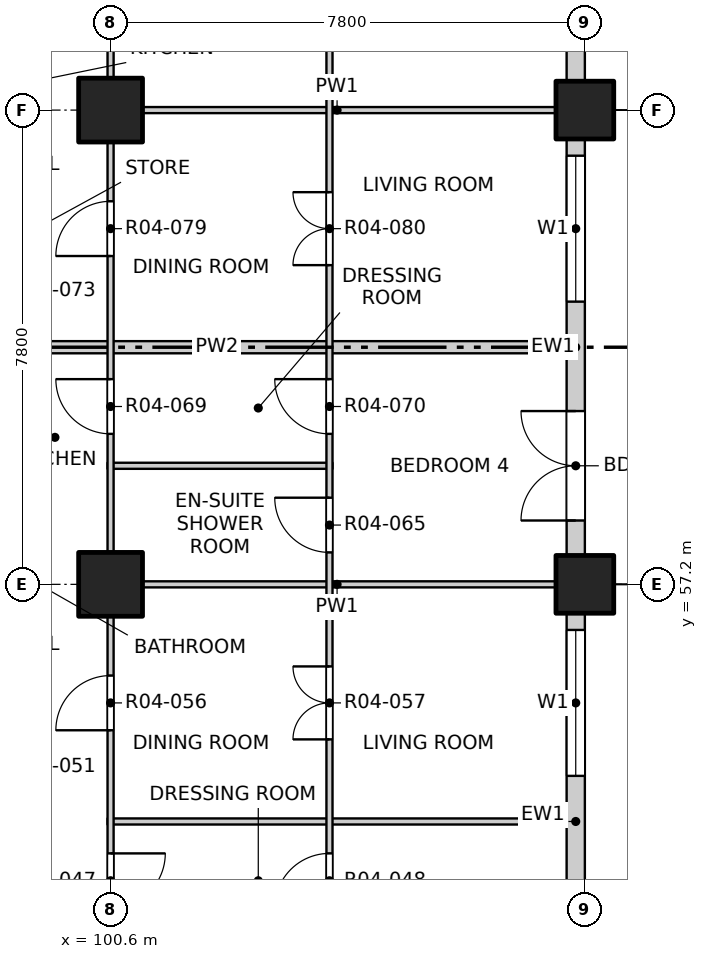
"""IFC4 building model, lengths in metres.
Left out: names, types, materials, properties, quantities, classifications, styles, units other than length and angle.
Written with IfcOpenShell. Run it as: python <this file> out.ifc"""

import sys

from ifc_helpers import new_model, si_unit, direction, frame, frame_2d, origin, origin_2d, place, context, subcontext, project, spatial, rectangle, extrude, element, fill, save


model = new_model("IFC4")
c1 = context("Model", 3, precision=1e-05, world=origin(), true_north=direction((0.0, 1.0)))
c2 = subcontext(c1, "Body", "Model", "MODEL_VIEW")
j1 = project(units=[si_unit("LENGTHUNIT", "METRE"), si_unit("PLANEANGLEUNIT", "RADIAN")], contexts=[c1])
p1 = place(None, origin())
s1 = spatial("IfcSite", under=j1, at=p1, CompositionType="ELEMENT")
p2 = place(p1, origin())
s2 = spatial("IfcBuilding", under=s1, at=p2, CompositionType="ELEMENT")
p3 = place(p2, frame((0.0, 0.0, 58.0)))
s3 = spatial("IfcBuildingStorey", under=s2, at=p3, CompositionType="ELEMENT", Elevation=58.0)
for number, where, z_axis, x_axis in (
    (1, (108.4, 57.2, -0.25), (0.0, 0.0, 1.0), (1.0, 0.0, 0.0)),
    (2, (108.4, 65.0, -0.25), (0.0, 0.0, 1.0), (1.0, 0.0, 0.0)),
):
    element("IfcColumn", number, at=place(p3, frame(where, z_axis=z_axis, x_axis=x_axis)), inside=s3, PredefinedType="COLUMN", context=c2, shape_type="SweptSolid", body=[
        extrude(rectangle(XDim=0.95, YDim=0.95, at=origin_2d()), origin(), (0.0, 0.0, 1.0), 3.4),
    ])
for number, where, z_axis, x_axis in (
    (3, (100.6, 57.2, -0.25), (0.0, 0.0, 1.0), (1.0, 0.0, 0.0)),
    (4, (100.6, 65.0, -0.25), (0.0, 0.0, 1.0), (1.0, 0.0, 0.0)),
):
    element("IfcColumn", number, at=place(p3, frame(where, z_axis=z_axis, x_axis=x_axis)), inside=s3, PredefinedType="COLUMN", context=c2, shape_type="SweptSolid", body=[
        extrude(rectangle(XDim=1.05, YDim=1.05, at=origin_2d()), origin(), (0.0, 0.0, 1.0), 3.4),
    ])
p4 = place(p3, frame((108.25, 49.875, 0.0), z_axis=(0.0, 0.0, 1.0), x_axis=(0.0, 1.0, 0.0)))
e5 = element("IfcWall", 5, at=p4, inside=s3, PredefinedType="SOLIDWALL", context=c2, shape_type="SweptSolid", body=[
    extrude(rectangle(XDim=6.85, YDim=0.3, at=frame_2d((3.425, 0.0))), origin(), (0.0, 0.0, 1.0), 2.7),
])
p5 = place(p4, frame((0.575, 0.0, 0.0)))
e6 = element("IfcOpeningElement", 6, at=p5, cuts=e5, PredefinedType="OPENING", context=c2, shape_type="SweptSolid", body=[
    extrude(rectangle(XDim=1.8, YDim=2.4, at=frame_2d((0.9, 1.2))), frame((0.0, 0.16, 0.0), z_axis=(0.0, -1.0, 0.0), x_axis=(1.0, 0.0, 0.0)), (0.0, 0.0, 1.0), 0.32),
])
p6 = place(p4, frame((4.175, 0.0, 0.9)))
e7 = element("IfcOpeningElement", 7, at=p6, cuts=e5, PredefinedType="OPENING", context=c2, shape_type="SweptSolid", body=[
    extrude(rectangle(XDim=2.4, YDim=1.8, at=frame_2d((1.2, 0.9))), frame((0.0, 0.16, 0.0), z_axis=(0.0, -1.0, 0.0), x_axis=(1.0, 0.0, 0.0)), (0.0, 0.0, 1.0), 0.32),
])
p7 = place(p3, frame((108.25, 57.675, 0.0), z_axis=(0.0, 0.0, 1.0), x_axis=(0.0, 1.0, 0.0)))
e8 = element("IfcWall", 8, at=p7, inside=s3, PredefinedType="SOLIDWALL", context=c2, shape_type="SweptSolid", body=[
    extrude(rectangle(XDim=6.85, YDim=0.3, at=frame_2d((3.425, 0.0))), origin(), (0.0, 0.0, 1.0), 2.7),
])
p8 = place(p7, frame((0.575, 0.0, 0.0)))
e9 = element("IfcOpeningElement", 9, at=p8, cuts=e8, PredefinedType="OPENING", context=c2, shape_type="SweptSolid", body=[
    extrude(rectangle(XDim=1.8, YDim=2.4, at=frame_2d((0.9, 1.2))), frame((0.0, 0.16, 0.0), z_axis=(0.0, -1.0, 0.0), x_axis=(1.0, 0.0, 0.0)), (0.0, 0.0, 1.0), 0.32),
])
p9 = place(p7, frame((4.175, 0.0, 0.9)))
e10 = element("IfcOpeningElement", 10, at=p9, cuts=e8, PredefinedType="OPENING", context=c2, shape_type="SweptSolid", body=[
    extrude(rectangle(XDim=2.4, YDim=1.8, at=frame_2d((1.2, 0.9))), frame((0.0, 0.16, 0.0), z_axis=(0.0, -1.0, 0.0), x_axis=(1.0, 0.0, 0.0)), (0.0, 0.0, 1.0), 0.32),
])
p10 = place(p3, frame((108.25, 65.475, 0.0), z_axis=(0.0, 0.0, 1.0), x_axis=(0.0, 1.0, 0.0)))
e11 = element("IfcWall", 11, at=p10, inside=s3, PredefinedType="SOLIDWALL", context=c2, shape_type="SweptSolid", body=[
    extrude(rectangle(XDim=6.85, YDim=0.3, at=frame_2d((3.425, 0.0))), origin(), (0.0, 0.0, 1.0), 2.7),
])
p11 = place(p10, frame((0.575, 0.0, 0.0)))
e12 = element("IfcOpeningElement", 12, at=p11, cuts=e11, PredefinedType="OPENING", context=c2, shape_type="SweptSolid", body=[
    extrude(rectangle(XDim=1.8, YDim=2.4, at=frame_2d((0.9, 1.2))), frame((0.0, 0.16, 0.0), z_axis=(0.0, -1.0, 0.0), x_axis=(1.0, 0.0, 0.0)), (0.0, 0.0, 1.0), 0.32),
])
p12 = place(p10, frame((4.175, 0.0, 0.9)))
e13 = element("IfcOpeningElement", 13, at=p12, cuts=e11, PredefinedType="OPENING", context=c2, shape_type="SweptSolid", body=[
    extrude(rectangle(XDim=2.4, YDim=1.8, at=frame_2d((1.2, 0.9))), frame((0.0, 0.16, 0.0), z_axis=(0.0, -1.0, 0.0), x_axis=(1.0, 0.0, 0.0)), (0.0, 0.0, 1.0), 0.32),
])
p13 = place(p3, frame((100.55, 53.3, 0.0), z_axis=(0.0, 0.0, 1.0), x_axis=(1.0, 0.0, 0.0)))
e14 = element("IfcWall", 14, at=p13, inside=s3, PredefinedType="PARTITIONING", context=c2, shape_type="SweptSolid", body=[
    extrude(rectangle(XDim=7.55, YDim=0.1, at=frame_2d((3.775, 0.0))), origin(), (0.0, 0.0, 1.0), 3.15),
])
p14 = place(p3, frame((100.55, 57.2, 0.0), z_axis=(0.0, 0.0, 1.0), x_axis=(1.0, 0.0, 0.0)))
e15 = element("IfcWall", 15, at=p14, inside=s3, PredefinedType="PARTITIONING", context=c2, shape_type="SweptSolid", body=[
    extrude(rectangle(XDim=7.55, YDim=0.1, at=frame_2d((3.775, 0.0))), origin(), (0.0, 0.0, 1.0), 2.55),
])
p15 = place(p3, frame((100.55, 59.15, 0.0), z_axis=(0.0, 0.0, 1.0), x_axis=(1.0, 0.0, 0.0)))
e16 = element("IfcWall", 16, at=p15, inside=s3, PredefinedType="PARTITIONING", context=c2, shape_type="SweptSolid", body=[
    extrude(rectangle(XDim=3.7, YDim=0.1, at=frame_2d((1.85, 0.0))), origin(), (0.0, 0.0, 1.0), 3.15),
])
p16 = place(p3, frame((96.6, 61.1, 0.0), z_axis=(0.0, 0.0, 1.0), x_axis=(1.0, 0.0, 0.0)))
e17 = element("IfcWall", 17, at=p16, inside=s3, PredefinedType="PARTITIONING", context=c2, shape_type="SweptSolid", body=[
    extrude(rectangle(XDim=11.5, YDim=0.2, at=frame_2d((5.75, 0.0))), origin(), (0.0, 0.0, 1.0), 3.15),
])
p17 = place(p3, frame((100.55, 65.0, 0.0), z_axis=(0.0, 0.0, 1.0), x_axis=(1.0, 0.0, 0.0)))
e18 = element("IfcWall", 18, at=p17, inside=s3, PredefinedType="PARTITIONING", context=c2, shape_type="SweptSolid", body=[
    extrude(rectangle(XDim=7.55, YDim=0.1, at=frame_2d((3.775, 0.0))), origin(), (0.0, 0.0, 1.0), 2.55),
])
p18 = place(p3, frame((100.6, 49.4, 0.0), z_axis=(0.0, 0.0, 1.0), x_axis=(0.0, 1.0, 0.0)))
e19 = element("IfcWall", 19, at=p18, inside=s3, PredefinedType="PARTITIONING", context=c2, shape_type="SweptSolid", body=[
    extrude(rectangle(XDim=31.2, YDim=0.1, at=frame_2d((15.6, 0.0))), origin(), (0.0, 0.0, 1.0), 3.15),
])
p19 = place(p18, frame((2.475, 0.0, 0.0)))
e20 = element("IfcOpeningElement", 20, at=p19, cuts=e19, PredefinedType="OPENING", context=c2, shape_type="SweptSolid", body=[
    extrude(rectangle(XDim=0.9, YDim=2.1, at=frame_2d((0.45, 1.05))), frame((0.0, 0.06, 0.0), z_axis=(0.0, -1.0, 0.0), x_axis=(1.0, 0.0, 0.0)), (0.0, 0.0, 1.0), 0.12),
])
p20 = place(p18, frame((5.4, 0.0, 0.0)))
e21 = element("IfcOpeningElement", 21, at=p20, cuts=e19, PredefinedType="OPENING", context=c2, shape_type="SweptSolid", body=[
    extrude(rectangle(XDim=0.9, YDim=2.1, at=frame_2d((0.45, 1.05))), frame((0.0, 0.06, 0.0), z_axis=(0.0, -1.0, 0.0), x_axis=(1.0, 0.0, 0.0)), (0.0, 0.0, 1.0), 0.12),
])
p21 = place(p18, frame((10.275, 0.0, 0.0)))
e22 = element("IfcOpeningElement", 22, at=p21, cuts=e19, PredefinedType="OPENING", context=c2, shape_type="SweptSolid", body=[
    extrude(rectangle(XDim=0.9, YDim=2.1, at=frame_2d((0.45, 1.05))), frame((0.0, 0.06, 0.0), z_axis=(0.0, -1.0, 0.0), x_axis=(1.0, 0.0, 0.0)), (0.0, 0.0, 1.0), 0.12),
])
p22 = place(p18, frame((13.2, 0.0, 0.0)))
e23 = element("IfcOpeningElement", 23, at=p22, cuts=e19, PredefinedType="OPENING", context=c2, shape_type="SweptSolid", body=[
    extrude(rectangle(XDim=0.9, YDim=2.1, at=frame_2d((0.45, 1.05))), frame((0.0, 0.06, 0.0), z_axis=(0.0, -1.0, 0.0), x_axis=(1.0, 0.0, 0.0)), (0.0, 0.0, 1.0), 0.12),
])
p23 = place(p18, frame((17.1, 0.0, 0.0)))
e24 = element("IfcOpeningElement", 24, at=p23, cuts=e19, PredefinedType="OPENING", context=c2, shape_type="SweptSolid", body=[
    extrude(rectangle(XDim=0.9, YDim=2.1, at=frame_2d((0.45, 1.05))), frame((0.0, 0.06, 0.0), z_axis=(0.0, -1.0, 0.0), x_axis=(1.0, 0.0, 0.0)), (0.0, 0.0, 1.0), 0.12),
])
p24 = place(p18, frame((21.8, 0.0, 0.0)))
e25 = element("IfcOpeningElement", 25, at=p24, cuts=e19, PredefinedType="OPENING", context=c2, shape_type="SweptSolid", body=[
    extrude(rectangle(XDim=0.9, YDim=2.1, at=frame_2d((0.45, 1.05))), frame((0.0, 0.06, 0.0), z_axis=(0.0, -1.0, 0.0), x_axis=(1.0, 0.0, 0.0)), (0.0, 0.0, 1.0), 0.12),
])
p25 = place(p18, frame((25.875, 0.0, 0.0)))
e26 = element("IfcOpeningElement", 26, at=p25, cuts=e19, PredefinedType="OPENING", context=c2, shape_type="SweptSolid", body=[
    extrude(rectangle(XDim=0.9, YDim=2.1, at=frame_2d((0.45, 1.05))), frame((0.0, 0.06, 0.0), z_axis=(0.0, -1.0, 0.0), x_axis=(1.0, 0.0, 0.0)), (0.0, 0.0, 1.0), 0.12),
])
p26 = place(p18, frame((28.8, 0.0, 0.0)))
e27 = element("IfcOpeningElement", 27, at=p26, cuts=e19, PredefinedType="OPENING", context=c2, shape_type="SweptSolid", body=[
    extrude(rectangle(XDim=0.9, YDim=2.1, at=frame_2d((0.45, 1.05))), frame((0.0, 0.06, 0.0), z_axis=(0.0, -1.0, 0.0), x_axis=(1.0, 0.0, 0.0)), (0.0, 0.0, 1.0), 0.12),
])
p27 = place(p3, frame((104.2, 41.9, 0.0), z_axis=(0.0, 0.0, 1.0), x_axis=(0.0, 1.0, 0.0)))
e28 = element("IfcWall", 28, at=p27, inside=s3, PredefinedType="PARTITIONING", context=c2, shape_type="SweptSolid", body=[
    extrude(rectangle(XDim=46.2, YDim=0.1, at=frame_2d((23.1, 0.0))), origin(), (0.0, 0.0, 1.0), 3.15),
])
p28 = place(p27, frame((1.05, 0.0, 0.0)))
e29 = element("IfcOpeningElement", 29, at=p28, cuts=e28, PredefinedType="OPENING", context=c2, shape_type="SweptSolid", body=[
    extrude(rectangle(XDim=1.2, YDim=2.1, at=frame_2d((0.6, 1.05))), frame((0.0, 0.06, 0.0), z_axis=(0.0, -1.0, 0.0), x_axis=(1.0, 0.0, 0.0)), (0.0, 0.0, 1.0), 0.12),
])
p29 = place(p27, frame((4.125, 0.0, 0.0)))
e30 = element("IfcOpeningElement", 30, at=p29, cuts=e28, PredefinedType="OPENING", context=c2, shape_type="SweptSolid", body=[
    extrude(rectangle(XDim=0.9, YDim=2.1, at=frame_2d((0.45, 1.05))), frame((0.0, 0.06, 0.0), z_axis=(0.0, -1.0, 0.0), x_axis=(1.0, 0.0, 0.0)), (0.0, 0.0, 1.0), 0.12),
])
p30 = place(p27, frame((6.075, 0.0, 0.0)))
e31 = element("IfcOpeningElement", 31, at=p30, cuts=e28, PredefinedType="OPENING", context=c2, shape_type="SweptSolid", body=[
    extrude(rectangle(XDim=0.9, YDim=2.1, at=frame_2d((0.45, 1.05))), frame((0.0, 0.06, 0.0), z_axis=(0.0, -1.0, 0.0), x_axis=(1.0, 0.0, 0.0)), (0.0, 0.0, 1.0), 0.12),
])
p31 = place(p27, frame((8.025, 0.0, 0.0)))
e32 = element("IfcOpeningElement", 32, at=p31, cuts=e28, PredefinedType="OPENING", context=c2, shape_type="SweptSolid", body=[
    extrude(rectangle(XDim=0.9, YDim=2.1, at=frame_2d((0.45, 1.05))), frame((0.0, 0.06, 0.0), z_axis=(0.0, -1.0, 0.0), x_axis=(1.0, 0.0, 0.0)), (0.0, 0.0, 1.0), 0.12),
])
p32 = place(p27, frame((9.975, 0.0, 0.0)))
e33 = element("IfcOpeningElement", 33, at=p32, cuts=e28, PredefinedType="OPENING", context=c2, shape_type="SweptSolid", body=[
    extrude(rectangle(XDim=0.9, YDim=2.1, at=frame_2d((0.45, 1.05))), frame((0.0, 0.06, 0.0), z_axis=(0.0, -1.0, 0.0), x_axis=(1.0, 0.0, 0.0)), (0.0, 0.0, 1.0), 0.12),
])
p33 = place(p27, frame((12.75, 0.0, 0.0)))
e34 = element("IfcOpeningElement", 34, at=p33, cuts=e28, PredefinedType="OPENING", context=c2, shape_type="SweptSolid", body=[
    extrude(rectangle(XDim=1.2, YDim=2.1, at=frame_2d((0.6, 1.05))), frame((0.0, 0.06, 0.0), z_axis=(0.0, -1.0, 0.0), x_axis=(1.0, 0.0, 0.0)), (0.0, 0.0, 1.0), 0.12),
])
p34 = place(p27, frame((15.825, 0.0, 0.0)))
e35 = element("IfcOpeningElement", 35, at=p34, cuts=e28, PredefinedType="OPENING", context=c2, shape_type="SweptSolid", body=[
    extrude(rectangle(XDim=0.9, YDim=2.1, at=frame_2d((0.45, 1.05))), frame((0.0, 0.06, 0.0), z_axis=(0.0, -1.0, 0.0), x_axis=(1.0, 0.0, 0.0)), (0.0, 0.0, 1.0), 0.12),
])
p35 = place(p27, frame((17.775, 0.0, 0.0)))
e36 = element("IfcOpeningElement", 36, at=p35, cuts=e28, PredefinedType="OPENING", context=c2, shape_type="SweptSolid", body=[
    extrude(rectangle(XDim=0.9, YDim=2.1, at=frame_2d((0.45, 1.05))), frame((0.0, 0.06, 0.0), z_axis=(0.0, -1.0, 0.0), x_axis=(1.0, 0.0, 0.0)), (0.0, 0.0, 1.0), 0.12),
])
p36 = place(p27, frame((20.55, 0.0, 0.0)))
e37 = element("IfcOpeningElement", 37, at=p36, cuts=e28, PredefinedType="OPENING", context=c2, shape_type="SweptSolid", body=[
    extrude(rectangle(XDim=1.2, YDim=2.1, at=frame_2d((0.6, 1.05))), frame((0.0, 0.06, 0.0), z_axis=(0.0, -1.0, 0.0), x_axis=(1.0, 0.0, 0.0)), (0.0, 0.0, 1.0), 0.12),
])
p37 = place(p27, frame((24.45, 0.0, 0.0)))
e38 = element("IfcOpeningElement", 38, at=p37, cuts=e28, PredefinedType="OPENING", context=c2, shape_type="SweptSolid", body=[
    extrude(rectangle(XDim=1.2, YDim=2.1, at=frame_2d((0.6, 1.05))), frame((0.0, 0.06, 0.0), z_axis=(0.0, -1.0, 0.0), x_axis=(1.0, 0.0, 0.0)), (0.0, 0.0, 1.0), 0.12),
])
p38 = place(p27, frame((27.525, 0.0, 0.0)))
e39 = element("IfcOpeningElement", 39, at=p38, cuts=e28, PredefinedType="OPENING", context=c2, shape_type="SweptSolid", body=[
    extrude(rectangle(XDim=0.9, YDim=2.1, at=frame_2d((0.45, 1.05))), frame((0.0, 0.06, 0.0), z_axis=(0.0, -1.0, 0.0), x_axis=(1.0, 0.0, 0.0)), (0.0, 0.0, 1.0), 0.12),
])
p39 = place(p27, frame((29.475, 0.0, 0.0)))
e40 = element("IfcOpeningElement", 40, at=p39, cuts=e28, PredefinedType="OPENING", context=c2, shape_type="SweptSolid", body=[
    extrude(rectangle(XDim=0.9, YDim=2.1, at=frame_2d((0.45, 1.05))), frame((0.0, 0.06, 0.0), z_axis=(0.0, -1.0, 0.0), x_axis=(1.0, 0.0, 0.0)), (0.0, 0.0, 1.0), 0.12),
])
p40 = place(p27, frame((31.425, 0.0, 0.0)))
e41 = element("IfcOpeningElement", 41, at=p40, cuts=e28, PredefinedType="OPENING", context=c2, shape_type="SweptSolid", body=[
    extrude(rectangle(XDim=0.9, YDim=2.1, at=frame_2d((0.45, 1.05))), frame((0.0, 0.06, 0.0), z_axis=(0.0, -1.0, 0.0), x_axis=(1.0, 0.0, 0.0)), (0.0, 0.0, 1.0), 0.12),
])
p41 = place(p27, frame((33.375, 0.0, 0.0)))
e42 = element("IfcOpeningElement", 42, at=p41, cuts=e28, PredefinedType="OPENING", context=c2, shape_type="SweptSolid", body=[
    extrude(rectangle(XDim=0.9, YDim=2.1, at=frame_2d((0.45, 1.05))), frame((0.0, 0.06, 0.0), z_axis=(0.0, -1.0, 0.0), x_axis=(1.0, 0.0, 0.0)), (0.0, 0.0, 1.0), 0.12),
])
p42 = place(p27, frame((36.15, 0.0, 0.0)))
e43 = element("IfcOpeningElement", 43, at=p42, cuts=e28, PredefinedType="OPENING", context=c2, shape_type="SweptSolid", body=[
    extrude(rectangle(XDim=1.2, YDim=2.1, at=frame_2d((0.6, 1.05))), frame((0.0, 0.06, 0.0), z_axis=(0.0, -1.0, 0.0), x_axis=(1.0, 0.0, 0.0)), (0.0, 0.0, 1.0), 0.12),
])
p43 = place(p27, frame((39.225, 0.0, 0.0)))
e44 = element("IfcOpeningElement", 44, at=p43, cuts=e28, PredefinedType="OPENING", context=c2, shape_type="SweptSolid", body=[
    extrude(rectangle(XDim=0.9, YDim=2.1, at=frame_2d((0.45, 1.05))), frame((0.0, 0.06, 0.0), z_axis=(0.0, -1.0, 0.0), x_axis=(1.0, 0.0, 0.0)), (0.0, 0.0, 1.0), 0.12),
])
p44 = place(p27, frame((41.175, 0.0, 0.0)))
e45 = element("IfcOpeningElement", 45, at=p44, cuts=e28, PredefinedType="OPENING", context=c2, shape_type="SweptSolid", body=[
    extrude(rectangle(XDim=0.9, YDim=2.1, at=frame_2d((0.45, 1.05))), frame((0.0, 0.06, 0.0), z_axis=(0.0, -1.0, 0.0), x_axis=(1.0, 0.0, 0.0)), (0.0, 0.0, 1.0), 0.12),
])
p45 = place(p27, frame((43.95, 0.0, 0.0)))
e46 = element("IfcOpeningElement", 46, at=p45, cuts=e28, PredefinedType="OPENING", context=c2, shape_type="SweptSolid", body=[
    extrude(rectangle(XDim=1.2, YDim=2.1, at=frame_2d((0.6, 1.05))), frame((0.0, 0.06, 0.0), z_axis=(0.0, -1.0, 0.0), x_axis=(1.0, 0.0, 0.0)), (0.0, 0.0, 1.0), 0.12),
])
p46 = place(p6, origin())
e47 = element("IfcWindow", 47, at=p46, inside=s3, PartitioningType="DOUBLE_PANEL_VERTICAL", PredefinedType="WINDOW", context=c2, shape_type="SweptSolid", body=[
    extrude(rectangle(XDim=2.4, YDim=1.8, at=frame_2d((1.2, 0.9))), frame((0.0, 0.03, 0.0), z_axis=(0.0, -1.0, 0.0), x_axis=(1.0, 0.0, 0.0)), (0.0, 0.0, 1.0), 0.06),
])
fill(e7, e47)
p47 = place(p8, origin())
e48 = element("IfcDoor", 48, at=p47, inside=s3, OperationType="DOUBLE_DOOR_SINGLE_SWING", PredefinedType="DOOR", context=c2, shape_type="SweptSolid", body=[
    extrude(rectangle(XDim=1.8, YDim=2.4, at=frame_2d((0.9, 1.2))), frame((0.0, 0.025, 0.0), z_axis=(0.0, -1.0, 0.0), x_axis=(1.0, 0.0, 0.0)), (0.0, 0.0, 1.0), 0.05),
])
fill(e9, e48)
p48 = place(p9, origin())
e49 = element("IfcWindow", 49, at=p48, inside=s3, PartitioningType="DOUBLE_PANEL_VERTICAL", PredefinedType="WINDOW", context=c2, shape_type="SweptSolid", body=[
    extrude(rectangle(XDim=2.4, YDim=1.8, at=frame_2d((1.2, 0.9))), frame((0.0, 0.03, 0.0), z_axis=(0.0, -1.0, 0.0), x_axis=(1.0, 0.0, 0.0)), (0.0, 0.0, 1.0), 0.06),
])
fill(e10, e49)
p49 = place(p19, origin())
e50 = element("IfcDoor", 50, at=p49, inside=s3, OperationType="SINGLE_SWING_LEFT", PredefinedType="DOOR", context=c2, shape_type="SweptSolid", body=[
    extrude(rectangle(XDim=0.9, YDim=2.1, at=frame_2d((0.45, 1.05))), frame((0.0, 0.025, 0.0), z_axis=(0.0, -1.0, 0.0), x_axis=(1.0, 0.0, 0.0)), (0.0, 0.0, 1.0), 0.05),
])
fill(e20, e50)
p50 = place(p32, origin())
e51 = element("IfcDoor", 51, at=p50, inside=s3, OperationType="SINGLE_SWING_LEFT", PredefinedType="DOOR", context=c2, shape_type="SweptSolid", body=[
    extrude(rectangle(XDim=0.9, YDim=2.1, at=frame_2d((0.45, 1.05))), frame((0.0, 0.025, 0.0), z_axis=(0.0, -1.0, 0.0), x_axis=(1.0, 0.0, 0.0)), (0.0, 0.0, 1.0), 0.05),
])
fill(e33, e51)
p51 = place(p20, origin())
e52 = element("IfcDoor", 52, at=p51, inside=s3, OperationType="SINGLE_SWING_LEFT", PredefinedType="DOOR", context=c2, shape_type="SweptSolid", body=[
    extrude(rectangle(XDim=0.9, YDim=2.1, at=frame_2d((0.45, 1.05))), frame((0.0, 0.025, 0.0), z_axis=(0.0, -1.0, 0.0), x_axis=(1.0, 0.0, 0.0)), (0.0, 0.0, 1.0), 0.05),
])
fill(e21, e52)
p52 = place(p33, origin())
e53 = element("IfcDoor", 53, at=p52, inside=s3, OperationType="DOUBLE_DOOR_SINGLE_SWING", PredefinedType="DOOR", context=c2, shape_type="SweptSolid", body=[
    extrude(rectangle(XDim=1.2, YDim=2.1, at=frame_2d((0.6, 1.05))), frame((0.0, 0.025, 0.0), z_axis=(0.0, -1.0, 0.0), x_axis=(1.0, 0.0, 0.0)), (0.0, 0.0, 1.0), 0.05),
])
fill(e34, e53)
p53 = place(p34, origin())
e54 = element("IfcDoor", 54, at=p53, inside=s3, OperationType="SINGLE_SWING_RIGHT", PredefinedType="DOOR", context=c2, shape_type="SweptSolid", body=[
    extrude(rectangle(XDim=0.9, YDim=2.1, at=frame_2d((0.45, 1.05))), frame((0.0, 0.025, 0.0), z_axis=(0.0, -1.0, 0.0), x_axis=(1.0, 0.0, 0.0)), (0.0, 0.0, 1.0), 0.05),
])
fill(e35, e54)
p54 = place(p21, origin())
e55 = element("IfcDoor", 55, at=p54, inside=s3, OperationType="SINGLE_SWING_RIGHT", PredefinedType="DOOR", context=c2, shape_type="SweptSolid", body=[
    extrude(rectangle(XDim=0.9, YDim=2.1, at=frame_2d((0.45, 1.05))), frame((0.0, 0.025, 0.0), z_axis=(0.0, -1.0, 0.0), x_axis=(1.0, 0.0, 0.0)), (0.0, 0.0, 1.0), 0.05),
])
fill(e22, e55)
p55 = place(p35, origin())
e56 = element("IfcDoor", 56, at=p55, inside=s3, OperationType="SINGLE_SWING_RIGHT", PredefinedType="DOOR", context=c2, shape_type="SweptSolid", body=[
    extrude(rectangle(XDim=0.9, YDim=2.1, at=frame_2d((0.45, 1.05))), frame((0.0, 0.025, 0.0), z_axis=(0.0, -1.0, 0.0), x_axis=(1.0, 0.0, 0.0)), (0.0, 0.0, 1.0), 0.05),
])
fill(e36, e56)
p56 = place(p22, origin())
e57 = element("IfcDoor", 57, at=p56, inside=s3, OperationType="SINGLE_SWING_LEFT", PredefinedType="DOOR", context=c2, shape_type="SweptSolid", body=[
    extrude(rectangle(XDim=0.9, YDim=2.1, at=frame_2d((0.45, 1.05))), frame((0.0, 0.025, 0.0), z_axis=(0.0, -1.0, 0.0), x_axis=(1.0, 0.0, 0.0)), (0.0, 0.0, 1.0), 0.05),
])
fill(e23, e57)
p57 = place(p36, origin())
e58 = element("IfcDoor", 58, at=p57, inside=s3, OperationType="DOUBLE_DOOR_SINGLE_SWING", PredefinedType="DOOR", context=c2, shape_type="SweptSolid", body=[
    extrude(rectangle(XDim=1.2, YDim=2.1, at=frame_2d((0.6, 1.05))), frame((0.0, 0.025, 0.0), z_axis=(0.0, -1.0, 0.0), x_axis=(1.0, 0.0, 0.0)), (0.0, 0.0, 1.0), 0.05),
])
fill(e37, e58)
save(model, sys.argv[1])
